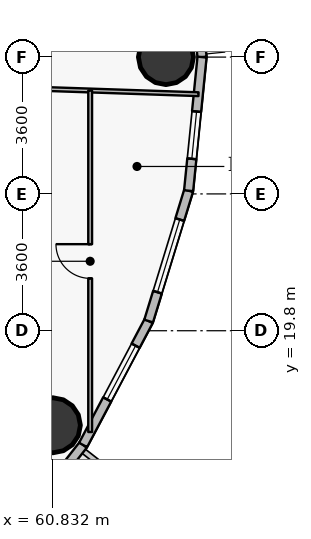
"""IFC4 building model, lengths in metres.
Left out: names, types, materials, properties, quantities, classifications, styles, units other than length and angle.
Written with IfcOpenShell. Run it as: python <this file> out.ifc"""

import sys

from ifc_helpers import new_model, si_unit, direction, frame, frame_2d, origin, origin_2d, place, context, subcontext, project, spatial, rectangle, hollow_circle, extrude, source, transform, mapped, element, fill, save


model = new_model("IFC4")
c1 = context("Model", 3, precision=1e-05, world=origin(), true_north=direction((0.0, 1.0)))
c2 = subcontext(c1, "Body", "Model", "MODEL_VIEW")
j1 = project(units=[si_unit("LENGTHUNIT", "METRE"), si_unit("PLANEANGLEUNIT", "RADIAN")], contexts=[c1])
p1 = place(None, origin())
s1 = spatial("IfcSite", under=j1, at=p1, CompositionType="ELEMENT")
p2 = place(p1, origin())
s2 = spatial("IfcBuilding", under=s1, at=p2, CompositionType="ELEMENT")
p3 = place(p2, frame((0.0, 0.0, 127.2)))
s3 = spatial("IfcBuildingStorey", under=s2, at=p3, CompositionType="ELEMENT", Elevation=127.2)
for number, where, z_axis, x_axis in (
    (1, (63.825, 27.0, 0.0), (0.0, 0.0, 1.0), (1.0, 0.0, 0.0)),
    (2, (60.849, 17.312, 0.0), (0.0, 0.0, 1.0), (1.0, 0.0, 0.0)),
):
    element("IfcColumn", number, at=place(p3, frame(where, z_axis=z_axis, x_axis=x_axis)), inside=s3, PredefinedType="COLUMN", context=c2, shape_type="SweptSolid", body=[
        extrude(hollow_circle(Radius=0.725, WallThickness=0.042, at=origin_2d()), origin(), (0.0, 0.0, 1.0), 3.75),
    ])
p4 = place(p3, frame((64.422, 30.515, 0.0), z_axis=(0.0, 0.0, 1.0), x_axis=(0.099989468229, -0.994988495533, 0.0)))
e3 = element("IfcWall", 3, at=p4, inside=s3, PredefinedType="SOLIDWALL", context=c2, shape_type="SweptSolid", body=[
    extrude(rectangle(XDim=3.533, YDim=0.24, at=frame_2d((1.767, 0.0))), origin(), (0.0, 0.0, 1.0), 3.5),
])
p5 = place(p3, frame((61.645, 16.794, 0.0), z_axis=(0.0, 0.0, 1.0), x_axis=(-0.616272103517, -0.787533297345, 0.0)))
e4 = element("IfcWall", 4, at=p5, inside=s3, PredefinedType="SOLIDWALL", context=c2, shape_type="SweptSolid", body=[
    extrude(rectangle(XDim=3.823, YDim=0.24, at=frame_2d((1.912, 0.0))), origin(), (0.0, 0.0, 1.0), 3.5),
])
p6 = place(p5, frame((0.674, 0.0, 0.9)))
e5 = element("IfcOpeningElement", 5, at=p6, cuts=e4, PredefinedType="OPENING", context=c2, shape_type="SweptSolid", body=[
    extrude(rectangle(XDim=1.25, YDim=1.65, at=origin_2d()), frame((0.625, 0.13, 0.825), z_axis=(0.0, -1.0, 0.0), x_axis=(1.0, 0.0, 0.0)), (0.0, 0.0, 1.0), 0.26),
])
p7 = place(p3, frame((63.37, 20.055, 0.0), z_axis=(0.0, 0.0, 1.0), x_axis=(-0.467614004126, -0.883932770716, 0.0)))
e6 = element("IfcWall", 6, at=p7, inside=s3, PredefinedType="SOLIDWALL", context=c2, shape_type="SweptSolid", body=[
    extrude(rectangle(XDim=3.689, YDim=0.24, at=frame_2d((1.844, 0.0))), origin(), (0.0, 0.0, 1.0), 3.5),
])
p8 = place(p7, frame((0.734, 0.0, 0.9)))
e7 = element("IfcOpeningElement", 7, at=p8, cuts=e6, PredefinedType="OPENING", context=c2, shape_type="SweptSolid", body=[
    extrude(rectangle(XDim=1.6, YDim=1.75, at=origin_2d()), frame((0.8, 0.13, 0.875), z_axis=(0.0, -1.0, 0.0), x_axis=(1.0, 0.0, 0.0)), (0.0, 0.0, 1.0), 0.26),
])
p9 = place(p3, frame((64.422, 23.485, 0.0), z_axis=(0.0, 0.0, 1.0), x_axis=(-0.293124431344, -0.956074300329, 0.0)))
e8 = element("IfcWall", 8, at=p9, inside=s3, PredefinedType="SOLIDWALL", context=c2, shape_type="SweptSolid", body=[
    extrude(rectangle(XDim=3.587, YDim=0.24, at=frame_2d((1.793, 0.0))), origin(), (0.0, 0.0, 1.0), 3.5),
])
p10 = place(p9, frame((0.794, 0.0, 0.9)))
e9 = element("IfcOpeningElement", 9, at=p10, cuts=e8, PredefinedType="OPENING", context=c2, shape_type="SweptSolid", body=[
    extrude(rectangle(XDim=2.0, YDim=1.75, at=origin_2d()), frame((1.0, 0.13, 0.875), z_axis=(0.0, -1.0, 0.0), x_axis=(1.0, 0.0, 0.0)), (0.0, 0.0, 1.0), 0.26),
])
p11 = place(p3, frame((64.775, 27.0, 0.0), z_axis=(0.0, 0.0, 1.0), x_axis=(-0.099989468229, -0.994988495533, 0.0)))
e10 = element("IfcWall", 10, at=p11, inside=s3, PredefinedType="SOLIDWALL", context=c2, shape_type="SweptSolid", body=[
    extrude(rectangle(XDim=3.533, YDim=0.24, at=frame_2d((1.767, 0.0))), origin(), (0.0, 0.0, 1.0), 3.5),
])
p12 = place(p11, frame((1.44, 0.0, 0.9)))
e11 = element("IfcOpeningElement", 11, at=p12, cuts=e10, PredefinedType="OPENING", context=c2, shape_type="SweptSolid", body=[
    extrude(rectangle(XDim=1.25, YDim=1.65, at=origin_2d()), frame((0.625, 0.13, 0.825), z_axis=(0.0, -1.0, 0.0), x_axis=(1.0, 0.0, 0.0)), (0.0, 0.0, 1.0), 0.26),
])
p13 = place(p3, frame((56.092, 26.316, 0.0), z_axis=(0.0, 0.0, 1.0), x_axis=(0.999421848377, -0.033999543924, 0.0)))
e12 = element("IfcWall", 12, at=p13, inside=s3, PredefinedType="PARTITIONING", context=c2, shape_type="SweptSolid", body=[
    extrude(rectangle(XDim=8.595, YDim=0.1, at=frame_2d((4.298, 0.0))), origin(), (0.0, 0.0, 1.0), 2.935),
])
p14 = place(p13, frame((2.441, 0.0, 0.0)))
e13 = element("IfcOpeningElement", 13, at=p14, cuts=e12, PredefinedType="OPENING", context=c2, shape_type="SweptSolid", body=[
    extrude(rectangle(XDim=0.9, YDim=2.1, at=origin_2d()), frame((0.45, 0.06, 1.05), z_axis=(0.0, -1.0, 0.0), x_axis=(1.0, 0.0, 0.0)), (0.0, 0.0, 1.0), 0.12),
])
p15 = place(p3, frame((61.831, 17.135, 0.0), z_axis=(0.0, 0.0, 1.0), x_axis=(0.0, 1.0, 0.0)))
e14 = element("IfcWall", 14, at=p15, inside=s3, PredefinedType="PARTITIONING", context=c2, shape_type="SweptSolid", body=[
    extrude(rectangle(XDim=8.986, YDim=0.1, at=frame_2d((4.493, 0.0))), origin(), (0.0, 0.0, 1.0), 2.935),
])
p16 = place(p15, frame((4.043, 0.0, 0.0)))
e15 = element("IfcOpeningElement", 15, at=p16, cuts=e14, PredefinedType="OPENING", context=c2, shape_type="SweptSolid", body=[
    extrude(rectangle(XDim=0.9, YDim=2.1, at=origin_2d()), frame((0.45, 0.06, 1.05), z_axis=(0.0, -1.0, 0.0), x_axis=(1.0, 0.0, 0.0)), (0.0, 0.0, 1.0), 0.12),
])
m1 = source(origin(), c2, "Body", "SweptSolid", [
    extrude(rectangle(XDim=1.6, YDim=1.75, at=origin_2d()), frame((0.8, 0.03, 0.875), z_axis=(0.0, -1.0, 0.0), x_axis=(1.0, 0.0, 0.0)), (0.0, 0.0, 1.0), 0.06),
])
p17 = place(p8, origin())
e16 = element("IfcWindow", 16, at=p17, inside=s3, PartitioningType="DOUBLE_PANEL_VERTICAL", PredefinedType="WINDOW", context=c2, shape_type="MappedRepresentation", body=[
    mapped(m1, transform((0.0, 0.0, 0.0), x_axis=(1.0, 0.0, 0.0), y_axis=(0.0, 1.0, 0.0), z_axis=(0.0, 0.0, 1.0), scale=1.0)),
])
fill(e7, e16)
m2 = source(origin(), c2, "Body", "SweptSolid", [
    extrude(rectangle(XDim=2.0, YDim=1.75, at=origin_2d()), frame((1.0, 0.03, 0.875), z_axis=(0.0, -1.0, 0.0), x_axis=(1.0, 0.0, 0.0)), (0.0, 0.0, 1.0), 0.06),
])
p18 = place(p10, origin())
e17 = element("IfcWindow", 17, at=p18, inside=s3, PartitioningType="DOUBLE_PANEL_VERTICAL", PredefinedType="WINDOW", context=c2, shape_type="MappedRepresentation", body=[
    mapped(m2, transform((0.0, 0.0, 0.0), x_axis=(1.0, 0.0, 0.0), y_axis=(0.0, 1.0, 0.0), z_axis=(0.0, 0.0, 1.0), scale=1.0)),
])
fill(e9, e17)
m3 = source(origin(), c2, "Body", "SweptSolid", [
    extrude(rectangle(XDim=1.25, YDim=1.65, at=origin_2d()), frame((0.625, 0.03, 0.825), z_axis=(0.0, -1.0, 0.0), x_axis=(1.0, 0.0, 0.0)), (0.0, 0.0, 1.0), 0.06),
])
p19 = place(p12, origin())
e18 = element("IfcWindow", 18, at=p19, inside=s3, PartitioningType="SINGLE_PANEL", PredefinedType="WINDOW", context=c2, shape_type="MappedRepresentation", body=[
    mapped(m3, transform((0.0, 0.0, 0.0), x_axis=(1.0, 0.0, 0.0), y_axis=(0.0, 1.0, 0.0), z_axis=(0.0, 0.0, 1.0), scale=1.0)),
])
fill(e11, e18)
m4 = source(origin(), c2, "Body", "SweptSolid", [
    extrude(rectangle(XDim=0.9, YDim=2.1, at=origin_2d()), frame((0.45, 0.025, 1.05), z_axis=(0.0, -1.0, 0.0), x_axis=(1.0, 0.0, 0.0)), (0.0, 0.0, 1.0), 0.05),
])
p20 = place(p16, origin())
e19 = element("IfcDoor", 19, at=p20, inside=s3, OperationType="SINGLE_SWING_RIGHT", PredefinedType="DOOR", context=c2, shape_type="MappedRepresentation", body=[
    mapped(m4, transform((0.0, 0.0, 0.0), x_axis=(1.0, 0.0, 0.0), y_axis=(0.0, 1.0, 0.0), z_axis=(0.0, 0.0, 1.0), scale=1.0)),
])
fill(e15, e19)
save(model, sys.argv[1])
